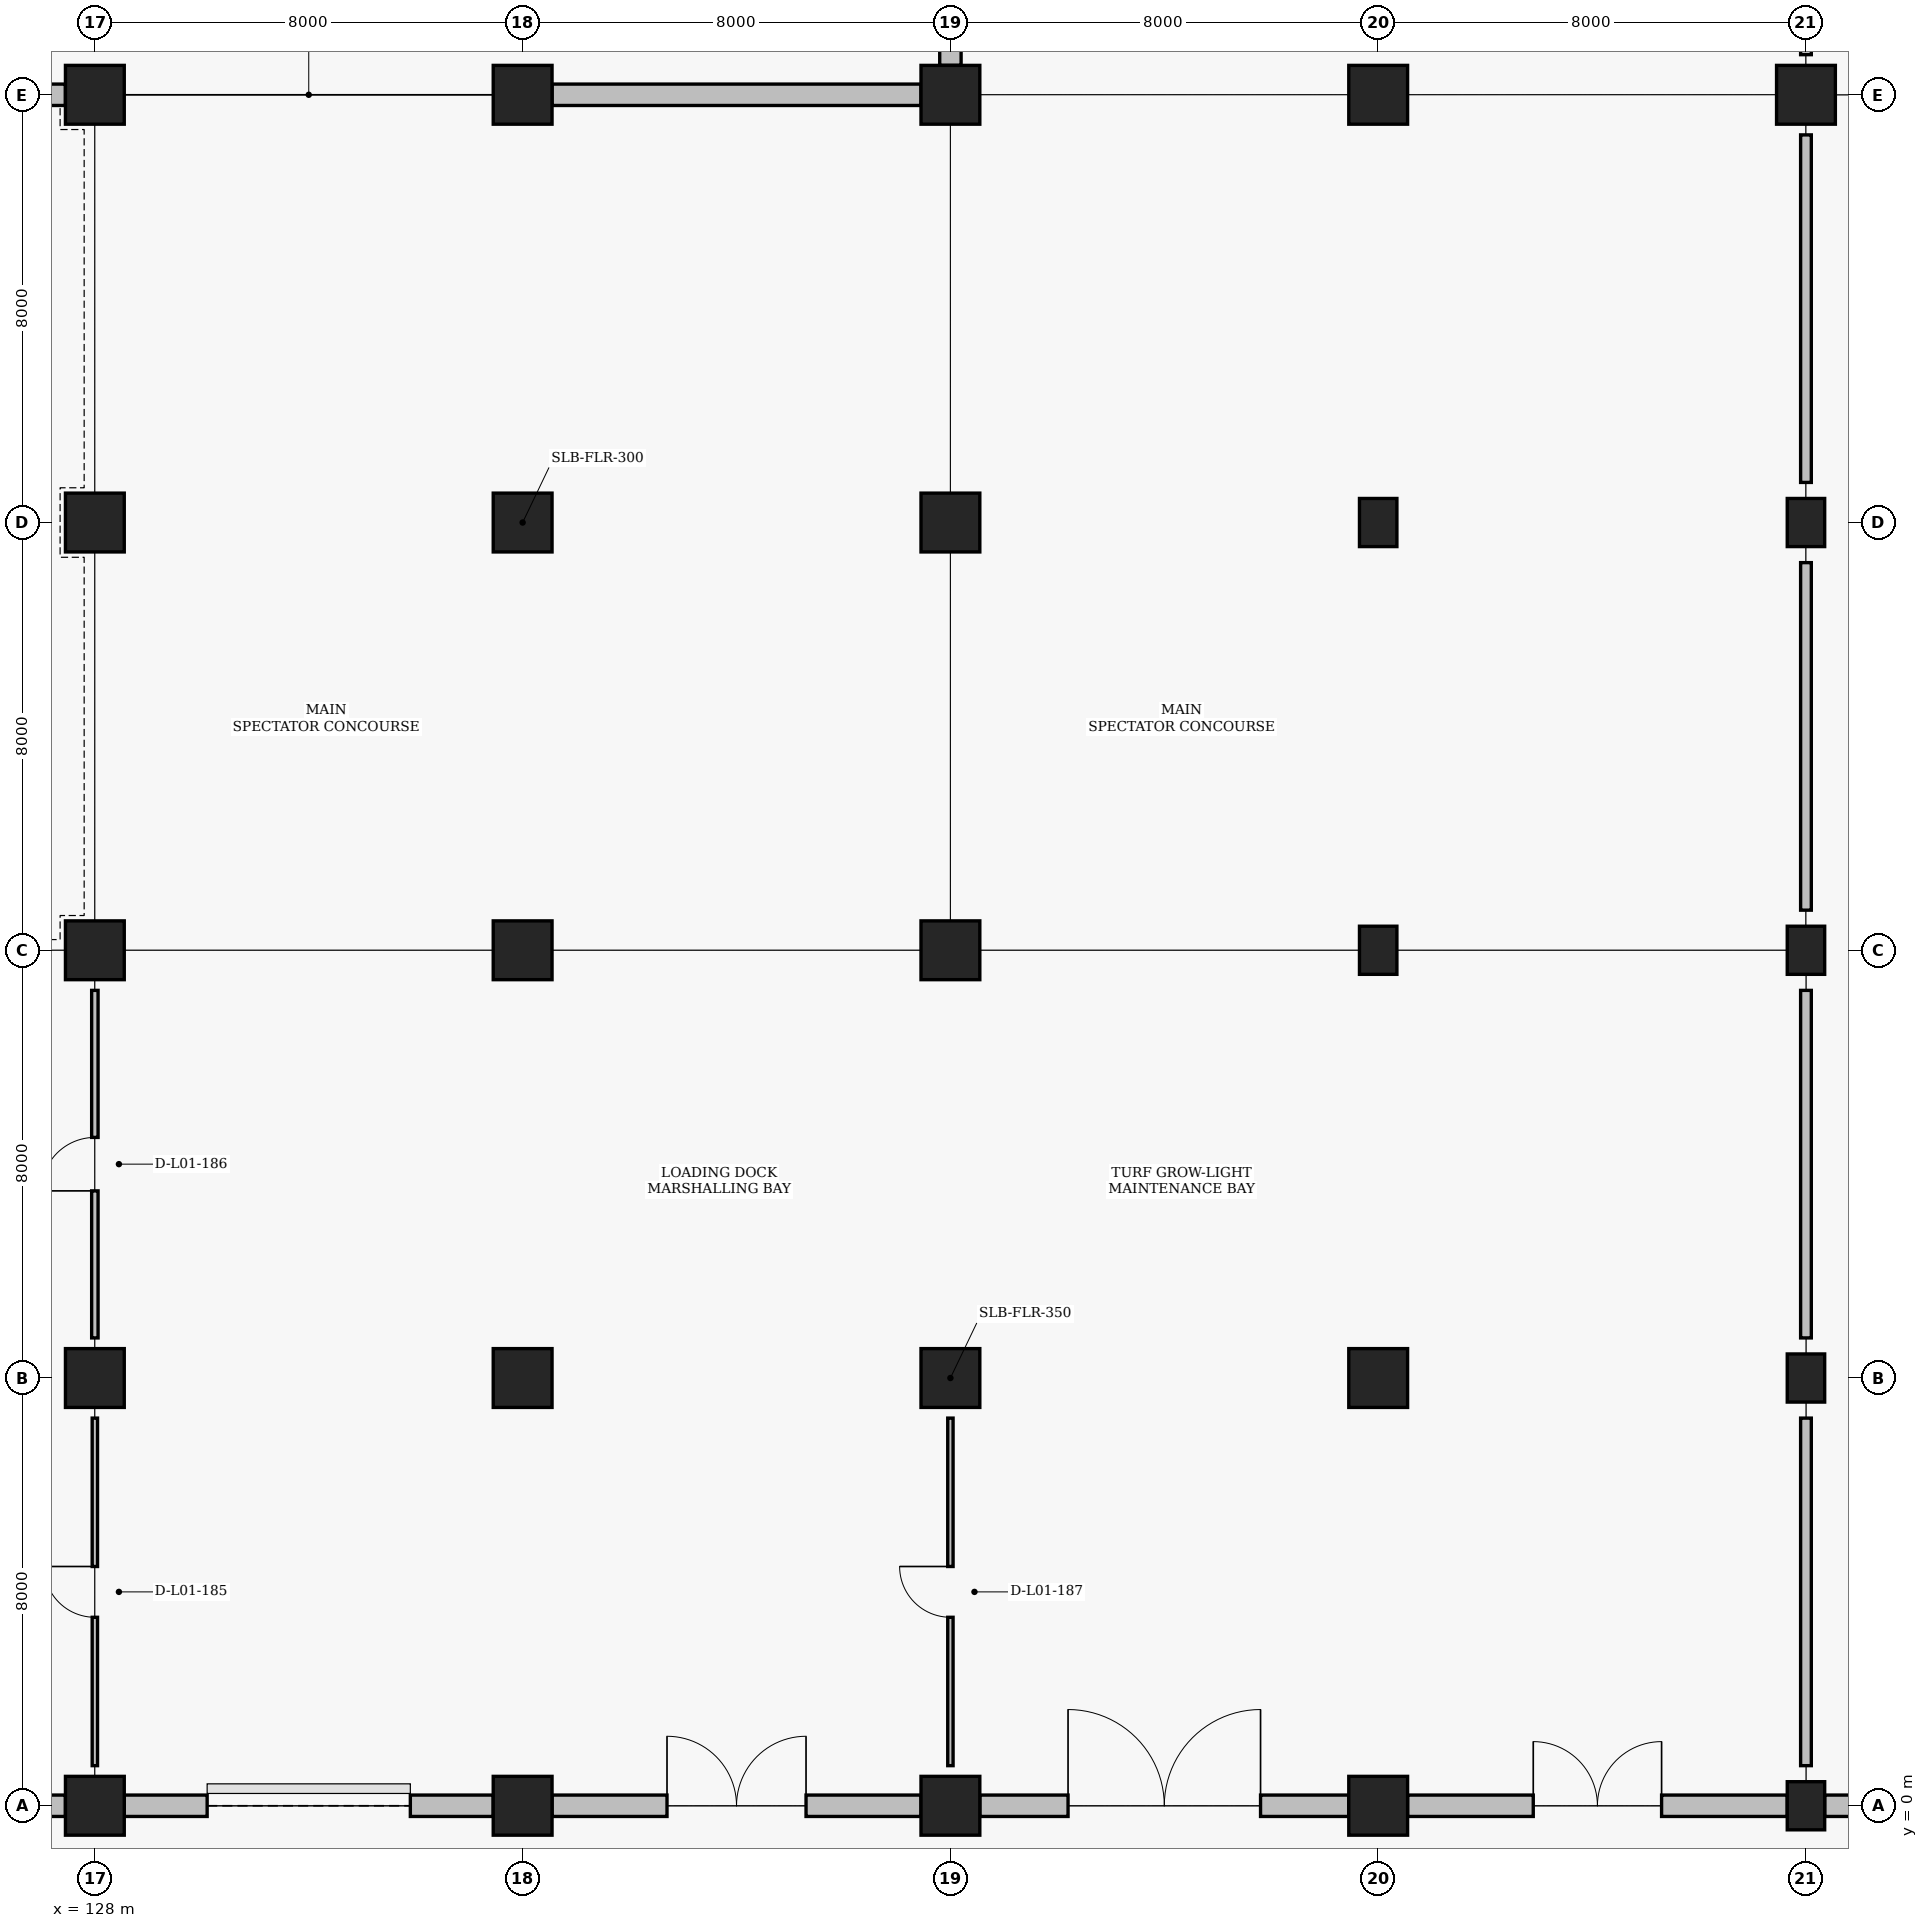
"""IFC4 building model, lengths in metres.
Left out: names, types, materials, properties, quantities, classifications, styles, units other than length and angle.
Written with IfcOpenShell. Run it as: python <this file> out.ifc"""

import sys

from ifc_helpers import new_model, si_unit, direction, frame, frame_2d, origin, origin_2d, place, context, subcontext, project, spatial, rectangle, extrude, element, fill, save


model = new_model("IFC4")
c1 = context("Model", 3, precision=1e-05, world=origin(), true_north=direction((0.0, 1.0)))
c2 = subcontext(c1, "Body", "Model", "MODEL_VIEW")
j1 = project(units=[si_unit("LENGTHUNIT", "METRE"), si_unit("PLANEANGLEUNIT", "RADIAN")], contexts=[c1])
p1 = place(None, origin())
s1 = spatial("IfcSite", under=j1, at=p1, CompositionType="ELEMENT")
p2 = place(p1, origin())
s2 = spatial("IfcBuilding", under=s1, at=p2, CompositionType="ELEMENT")
p3 = place(p2, origin())
s3 = spatial("IfcBuildingStorey", under=s2, at=p3, CompositionType="ELEMENT", Elevation=0.0)
for number, where, z_axis, x_axis in (
    (1, (128.0, 0.0, 0.0), (0.0, 0.0, 1.0), (1.0, 0.0, 0.0)),
    (2, (128.0, 8.0, 0.0), (0.0, 0.0, 1.0), (1.0, 0.0, 0.0)),
    (3, (128.0, 16.0, 0.0), (0.0, 0.0, 1.0), (1.0, 0.0, 0.0)),
    (4, (128.0, 24.0, 0.0), (0.0, 0.0, 1.0), (1.0, 0.0, 0.0)),
    (5, (128.0, 32.0, 0.0), (0.0, 0.0, 1.0), (1.0, 0.0, 0.0)),
    (6, (136.0, 0.0, 0.0), (0.0, 0.0, 1.0), (1.0, 0.0, 0.0)),
    (7, (136.0, 8.0, 0.0), (0.0, 0.0, 1.0), (1.0, 0.0, 0.0)),
    (8, (136.0, 16.0, 0.0), (0.0, 0.0, 1.0), (1.0, 0.0, 0.0)),
    (9, (136.0, 24.0, 0.0), (0.0, 0.0, 1.0), (1.0, 0.0, 0.0)),
    (10, (136.0, 32.0, 0.0), (0.0, 0.0, 1.0), (1.0, 0.0, 0.0)),
    (11, (144.0, 0.0, 0.0), (0.0, 0.0, 1.0), (1.0, 0.0, 0.0)),
    (12, (144.0, 8.0, 0.0), (0.0, 0.0, 1.0), (1.0, 0.0, 0.0)),
    (13, (144.0, 16.0, 0.0), (0.0, 0.0, 1.0), (1.0, 0.0, 0.0)),
    (14, (144.0, 24.0, 0.0), (0.0, 0.0, 1.0), (1.0, 0.0, 0.0)),
    (15, (144.0, 32.0, 0.0), (0.0, 0.0, 1.0), (1.0, 0.0, 0.0)),
    (16, (152.0, 0.0, 0.0), (0.0, 0.0, 1.0), (1.0, 0.0, 0.0)),
    (17, (152.0, 8.0, 0.0), (0.0, 0.0, 1.0), (1.0, 0.0, 0.0)),
):
    element("IfcColumn", number, at=place(p3, frame(where, z_axis=z_axis, x_axis=x_axis)), inside=s3, PredefinedType="COLUMN", context=c2, shape_type="SweptSolid", body=[
        extrude(rectangle(XDim=1.1, YDim=1.1, at=origin_2d()), origin(), (0.0, 0.0, 1.0), 4.8),
    ])
for number, where, z_axis, x_axis in (
    (18, (152.0, 16.0, 0.0), (0.0, 0.0, 1.0), (1.0, 0.0, 0.0)),
    (19, (152.0, 24.0, 0.0), (0.0, 0.0, 1.0), (1.0, 0.0, 0.0)),
):
    element("IfcColumn", number, at=place(p3, frame(where, z_axis=z_axis, x_axis=x_axis)), inside=s3, PredefinedType="COLUMN", context=c2, shape_type="SweptSolid", body=[
        extrude(rectangle(XDim=0.7, YDim=0.9, at=origin_2d()), origin(), (0.0, 0.0, 1.0), 4.8),
    ])
p4 = place(p3, frame((152.0, 32.0, 0.0), z_axis=(0.0, 0.0, 1.0), x_axis=(1.0, 0.0, 0.0)))
e20 = element("IfcColumn", 20, at=p4, inside=s3, PredefinedType="COLUMN", context=c2, shape_type="SweptSolid", body=[
    extrude(rectangle(XDim=1.1, YDim=1.1, at=origin_2d()), origin(), (0.0, 0.0, 1.0), 4.8),
])
for number, where, z_axis, x_axis in (
    (21, (160.0, 0.0, 0.0), (0.0, 0.0, 1.0), (1.0, 0.0, 0.0)),
    (22, (160.0, 8.0, 0.0), (0.0, 0.0, 1.0), (1.0, 0.0, 0.0)),
    (23, (160.0, 16.0, 0.0), (0.0, 0.0, 1.0), (1.0, 0.0, 0.0)),
    (24, (160.0, 24.0, 0.0), (0.0, 0.0, 1.0), (1.0, 0.0, 0.0)),
):
    element("IfcColumn", number, at=place(p3, frame(where, z_axis=z_axis, x_axis=x_axis)), inside=s3, PredefinedType="COLUMN", context=c2, shape_type="SweptSolid", body=[
        extrude(rectangle(XDim=0.7, YDim=0.9, at=origin_2d()), origin(), (0.0, 0.0, 1.0), 4.8),
    ])
p5 = place(p3, frame((160.0, 32.0, 0.0), z_axis=(0.0, 0.0, 1.0), x_axis=(1.0, 0.0, 0.0)))
e25 = element("IfcColumn", 25, at=p5, inside=s3, PredefinedType="COLUMN", context=c2, shape_type="SweptSolid", body=[
    extrude(rectangle(XDim=1.1, YDim=1.1, at=origin_2d()), origin(), (0.0, 0.0, 1.0), 4.8),
])
p6 = place(p3, frame((120.55, 0.0, 0.0), z_axis=(0.0, 0.0, 1.0), x_axis=(1.0, 0.0, 0.0)))
e26 = element("IfcWall", 26, at=p6, inside=s3, PredefinedType="SOLIDWALL", context=c2, shape_type="SweptSolid", body=[
    extrude(rectangle(XDim=6.9, YDim=0.4, at=frame_2d((3.45, 0.0))), origin(), (0.0, 0.0, 1.0), 3.81),
])
p7 = place(p6, frame((2.05, 0.0, 0.0)))
e27 = element("IfcOpeningElement", 27, at=p7, cuts=e26, PredefinedType="OPENING", context=c2, shape_type="SweptSolid", body=[
    extrude(rectangle(XDim=2.8, YDim=2.55, at=frame_2d((1.4, 1.275))), frame((0.0, 0.21, 0.0), z_axis=(0.0, -1.0, 0.0), x_axis=(1.0, 0.0, 0.0)), (0.0, 0.0, 1.0), 0.42),
])
p8 = place(p3, frame((120.55, 32.0, 0.0), z_axis=(0.0, 0.0, 1.0), x_axis=(1.0, 0.0, 0.0)))
e28 = element("IfcWall", 28, at=p8, inside=s3, PredefinedType="SOLIDWALL", context=c2, shape_type="SweptSolid", body=[
    extrude(rectangle(XDim=6.9, YDim=0.4, at=frame_2d((3.45, 0.0))), origin(), (0.0, 0.0, 1.0), 3.81),
])
p9 = place(p3, frame((128.55, 0.0, 0.0), z_axis=(0.0, 0.0, 1.0), x_axis=(1.0, 0.0, 0.0)))
e29 = element("IfcWall", 29, at=p9, inside=s3, PredefinedType="SOLIDWALL", context=c2, shape_type="SweptSolid", body=[
    extrude(rectangle(XDim=6.9, YDim=0.4, at=frame_2d((3.45, 0.0))), origin(), (0.0, 0.0, 1.0), 3.81),
])
p10 = place(p9, frame((1.55, 0.0, 0.0)))
e30 = element("IfcOpeningElement", 30, at=p10, cuts=e29, PredefinedType="OPENING", context=c2, shape_type="SweptSolid", body=[
    extrude(rectangle(XDim=3.8, YDim=3.4, at=frame_2d((1.9, 1.7))), frame((0.0, 0.21, 0.0), z_axis=(0.0, -1.0, 0.0), x_axis=(1.0, 0.0, 0.0)), (0.0, 0.0, 1.0), 0.42),
])
p11 = place(p3, frame((136.55, 0.0, 0.0), z_axis=(0.0, 0.0, 1.0), x_axis=(1.0, 0.0, 0.0)))
e31 = element("IfcWall", 31, at=p11, inside=s3, PredefinedType="SOLIDWALL", context=c2, shape_type="SweptSolid", body=[
    extrude(rectangle(XDim=6.9, YDim=0.4, at=frame_2d((3.45, 0.0))), origin(), (0.0, 0.0, 1.0), 3.81),
])
p12 = place(p11, frame((2.15, 0.0, 0.0)))
e32 = element("IfcOpeningElement", 32, at=p12, cuts=e31, PredefinedType="OPENING", context=c2, shape_type="SweptSolid", body=[
    extrude(rectangle(XDim=2.6, YDim=2.5, at=frame_2d((1.3, 1.25))), frame((0.0, 0.21, 0.0), z_axis=(0.0, -1.0, 0.0), x_axis=(1.0, 0.0, 0.0)), (0.0, 0.0, 1.0), 0.42),
])
p13 = place(p3, frame((136.55, 32.0, 0.0), z_axis=(0.0, 0.0, 1.0), x_axis=(1.0, 0.0, 0.0)))
e33 = element("IfcWall", 33, at=p13, inside=s3, PredefinedType="SOLIDWALL", context=c2, shape_type="SweptSolid", body=[
    extrude(rectangle(XDim=6.9, YDim=0.4, at=frame_2d((3.45, 0.0))), origin(), (0.0, 0.0, 1.0), 3.81),
])
p14 = place(p3, frame((144.55, 0.0, 0.0), z_axis=(0.0, 0.0, 1.0), x_axis=(1.0, 0.0, 0.0)))
e34 = element("IfcWall", 34, at=p14, inside=s3, PredefinedType="SOLIDWALL", context=c2, shape_type="SweptSolid", body=[
    extrude(rectangle(XDim=6.9, YDim=0.4, at=frame_2d((3.45, 0.0))), origin(), (0.0, 0.0, 1.0), 3.81),
])
p15 = place(p14, frame((1.65, 0.0, 0.0)))
e35 = element("IfcOpeningElement", 35, at=p15, cuts=e34, PredefinedType="OPENING", context=c2, shape_type="SweptSolid", body=[
    extrude(rectangle(XDim=3.6, YDim=2.8, at=frame_2d((1.8, 1.4))), frame((0.0, 0.21, 0.0), z_axis=(0.0, -1.0, 0.0), x_axis=(1.0, 0.0, 0.0)), (0.0, 0.0, 1.0), 0.42),
])
p16 = place(p3, frame((144.0, 32.55, 0.0), z_axis=(0.0, 0.0, 1.0), x_axis=(0.0, 1.0, 0.0)))
e36 = element("IfcWall", 36, at=p16, inside=s3, PredefinedType="SOLIDWALL", context=c2, shape_type="SweptSolid", body=[
    extrude(rectangle(XDim=6.9, YDim=0.4, at=frame_2d((3.45, 0.0))), origin(), (0.0, 0.0, 1.0), 3.81),
])
p17 = place(p16, frame((1.95, 0.0, 0.95)))
e37 = element("IfcOpeningElement", 37, at=p17, cuts=e36, PredefinedType="OPENING", context=c2, shape_type="SweptSolid", body=[
    extrude(rectangle(XDim=3.0, YDim=2.1, at=frame_2d((1.5, 1.05))), frame((0.0, 0.21, 0.0), z_axis=(0.0, -1.0, 0.0), x_axis=(1.0, 0.0, 0.0)), (0.0, 0.0, 1.0), 0.42),
])
p18 = place(p3, frame((152.55, 0.0, 0.0), z_axis=(0.0, 0.0, 1.0), x_axis=(1.0, 0.0, 0.0)))
e38 = element("IfcWall", 38, at=p18, inside=s3, PredefinedType="SOLIDWALL", context=c2, shape_type="SweptSolid", body=[
    extrude(rectangle(XDim=7.1, YDim=0.4, at=frame_2d((3.55, 0.0))), origin(), (0.0, 0.0, 1.0), 3.81),
])
p19 = place(p18, frame((2.35, 0.0, 0.0)))
e39 = element("IfcOpeningElement", 39, at=p19, cuts=e38, PredefinedType="OPENING", context=c2, shape_type="SweptSolid", body=[
    extrude(rectangle(XDim=2.4, YDim=2.4, at=frame_2d((1.2, 1.2))), frame((0.0, 0.21, 0.0), z_axis=(0.0, -1.0, 0.0), x_axis=(1.0, 0.0, 0.0)), (0.0, 0.0, 1.0), 0.42),
])
p20 = place(p3, frame((167.65, 0.0, 0.0), z_axis=(0.0, 0.0, 1.0), x_axis=(-1.0, 0.0, 0.0)))
e40 = element("IfcWall", 40, at=p20, inside=s3, PredefinedType="SOLIDWALL", context=c2, shape_type="SweptSolid", body=[
    extrude(rectangle(XDim=7.3, YDim=0.4, at=frame_2d((3.65, 0.0))), origin(), (0.0, 0.0, 1.0), 3.81),
])
p21 = place(p20, frame((2.95, 0.0, 0.0)))
e41 = element("IfcOpeningElement", 41, at=p21, cuts=e40, PredefinedType="OPENING", context=c2, shape_type="SweptSolid", body=[
    extrude(rectangle(XDim=1.4, YDim=2.2, at=frame_2d((0.7, 1.1))), frame((0.0, 0.21, 0.0), z_axis=(0.0, -1.0, 0.0), x_axis=(1.0, 0.0, 0.0)), (0.0, 0.0, 1.0), 0.42),
])
for number, where, z_axis, x_axis in (
    (42, (160.0, 0.75, 0.0), (0.0, 0.0, 1.0), (0.0, 1.0, 0.0)),
    (43, (160.0, 8.75, 0.0), (0.0, 0.0, 1.0), (0.0, 1.0, 0.0)),
    (44, (160.0, 16.75, 0.0), (0.0, 0.0, 1.0), (0.0, 1.0, 0.0)),
    (45, (160.0, 24.75, 0.0), (0.0, 0.0, 1.0), (0.0, 1.0, 0.0)),
    (46, (160.0, 32.75, 0.0), (0.0, 0.0, 1.0), (0.0, 1.0, 0.0)),
):
    element("IfcWall", number, at=place(p3, frame(where, z_axis=z_axis, x_axis=x_axis)), inside=s3, PredefinedType="PARTITIONING", context=c2, shape_type="SweptSolid", body=[
        extrude(rectangle(XDim=6.5, YDim=0.2, at=frame_2d((3.25, 0.0))), origin(), (0.0, 0.0, 1.0), 3.81),
    ])
p22 = place(p3, frame((128.0, 0.75, 0.0), z_axis=(0.0, 0.0, 1.0), x_axis=(0.0, 1.0, 0.0)))
e47 = element("IfcWall", 47, at=p22, inside=s3, PredefinedType="PARTITIONING", context=c2, shape_type="SweptSolid", body=[
    extrude(rectangle(XDim=6.5, YDim=0.1, at=frame_2d((3.25, 0.0))), origin(), (0.0, 0.0, 1.0), 3.81),
])
p23 = place(p22, frame((2.775, 0.0, 0.0)))
e48 = element("IfcOpeningElement", 48, at=p23, cuts=e47, PredefinedType="OPENING", context=c2, shape_type="SweptSolid", body=[
    extrude(rectangle(XDim=0.95, YDim=2.1, at=frame_2d((0.475, 1.05))), frame((0.0, 0.06, 0.0), z_axis=(0.0, -1.0, 0.0), x_axis=(1.0, 0.0, 0.0)), (0.0, 0.0, 1.0), 0.12),
])
p24 = place(p3, frame((128.0, 8.75, 0.0), z_axis=(0.0, 0.0, 1.0), x_axis=(0.0, 1.0, 0.0)))
e49 = element("IfcWall", 49, at=p24, inside=s3, PredefinedType="PARTITIONING", context=c2, shape_type="SweptSolid", body=[
    extrude(rectangle(XDim=6.5, YDim=0.12, at=frame_2d((3.25, 0.0))), origin(), (0.0, 0.0, 1.0), 3.81),
])
p25 = place(p24, frame((2.75, 0.0, 0.0)))
e50 = element("IfcOpeningElement", 50, at=p25, cuts=e49, PredefinedType="OPENING", context=c2, shape_type="SweptSolid", body=[
    extrude(rectangle(XDim=1.0, YDim=2.1, at=frame_2d((0.5, 1.05))), frame((0.0, 0.07, 0.0), z_axis=(0.0, -1.0, 0.0), x_axis=(1.0, 0.0, 0.0)), (0.0, 0.0, 1.0), 0.14),
])
p26 = place(p3, frame((144.0, 0.75, 0.0), z_axis=(0.0, 0.0, 1.0), x_axis=(0.0, 1.0, 0.0)))
e51 = element("IfcWall", 51, at=p26, inside=s3, PredefinedType="PARTITIONING", context=c2, shape_type="SweptSolid", body=[
    extrude(rectangle(XDim=6.5, YDim=0.1, at=frame_2d((3.25, 0.0))), origin(), (0.0, 0.0, 1.0), 3.81),
])
p27 = place(p26, frame((2.775, 0.0, 0.0)))
e52 = element("IfcOpeningElement", 52, at=p27, cuts=e51, PredefinedType="OPENING", context=c2, shape_type="SweptSolid", body=[
    extrude(rectangle(XDim=0.95, YDim=2.1, at=frame_2d((0.475, 1.05))), frame((0.0, 0.06, 0.0), z_axis=(0.0, -1.0, 0.0), x_axis=(1.0, 0.0, 0.0)), (0.0, 0.0, 1.0), 0.12),
])
p28 = place(p10, origin())
e53 = element("IfcDoor", 53, at=p28, inside=s3, OperationType="ROLLINGUP", PredefinedType="GATE", context=c2, shape_type="SweptSolid", body=[
    extrude(rectangle(XDim=3.8, YDim=3.4, at=frame_2d((1.9, 1.7))), frame((0.0, 0.025, 0.0), z_axis=(0.0, -1.0, 0.0), x_axis=(1.0, 0.0, 0.0)), (0.0, 0.0, 1.0), 0.05),
])
fill(e30, e53)
p29 = place(p12, origin())
e54 = element("IfcDoor", 54, at=p29, inside=s3, OperationType="DOUBLE_SWING_LEFT", PredefinedType="DOOR", context=c2, shape_type="SweptSolid", body=[
    extrude(rectangle(XDim=2.6, YDim=2.5, at=frame_2d((1.3, 1.25))), frame((0.0, 0.025, 0.0), z_axis=(0.0, -1.0, 0.0), x_axis=(1.0, 0.0, 0.0)), (0.0, 0.0, 1.0), 0.05),
])
fill(e32, e54)
p30 = place(p15, origin())
e55 = element("IfcDoor", 55, at=p30, inside=s3, OperationType="DOUBLE_SWING_LEFT", PredefinedType="DOOR", context=c2, shape_type="SweptSolid", body=[
    extrude(rectangle(XDim=3.6, YDim=2.8, at=frame_2d((1.8, 1.4))), frame((0.0, 0.025, 0.0), z_axis=(0.0, -1.0, 0.0), x_axis=(1.0, 0.0, 0.0)), (0.0, 0.0, 1.0), 0.05),
])
fill(e35, e55)
p31 = place(p19, origin())
e56 = element("IfcDoor", 56, at=p31, inside=s3, OperationType="DOUBLE_SWING_LEFT", PredefinedType="DOOR", context=c2, shape_type="SweptSolid", body=[
    extrude(rectangle(XDim=2.4, YDim=2.4, at=frame_2d((1.2, 1.2))), frame((0.0, 0.025, 0.0), z_axis=(0.0, -1.0, 0.0), x_axis=(1.0, 0.0, 0.0)), (0.0, 0.0, 1.0), 0.05),
])
fill(e39, e56)
p32 = place(p23, origin())
e57 = element("IfcDoor", 57, at=p32, inside=s3, OperationType="SINGLE_SWING_RIGHT", PredefinedType="DOOR", context=c2, shape_type="SweptSolid", body=[
    extrude(rectangle(XDim=0.95, YDim=2.1, at=frame_2d((0.475, 1.05))), frame((0.0, 0.025, 0.0), z_axis=(0.0, -1.0, 0.0), x_axis=(1.0, 0.0, 0.0)), (0.0, 0.0, 1.0), 0.05),
])
fill(e48, e57)
p33 = place(p25, origin())
e58 = element("IfcDoor", 58, at=p33, inside=s3, OperationType="SINGLE_SWING_LEFT", PredefinedType="DOOR", context=c2, shape_type="SweptSolid", body=[
    extrude(rectangle(XDim=1.0, YDim=2.1, at=frame_2d((0.5, 1.05))), frame((0.0, 0.025, 0.0), z_axis=(0.0, -1.0, 0.0), x_axis=(1.0, 0.0, 0.0)), (0.0, 0.0, 1.0), 0.05),
])
fill(e50, e58)
p34 = place(p27, origin())
e59 = element("IfcDoor", 59, at=p34, inside=s3, OperationType="SINGLE_SWING_RIGHT", PredefinedType="DOOR", context=c2, shape_type="SweptSolid", body=[
    extrude(rectangle(XDim=0.95, YDim=2.1, at=frame_2d((0.475, 1.05))), frame((0.0, 0.025, 0.0), z_axis=(0.0, -1.0, 0.0), x_axis=(1.0, 0.0, 0.0)), (0.0, 0.0, 1.0), 0.05),
])
fill(e52, e59)
save(model, sys.argv[1])
